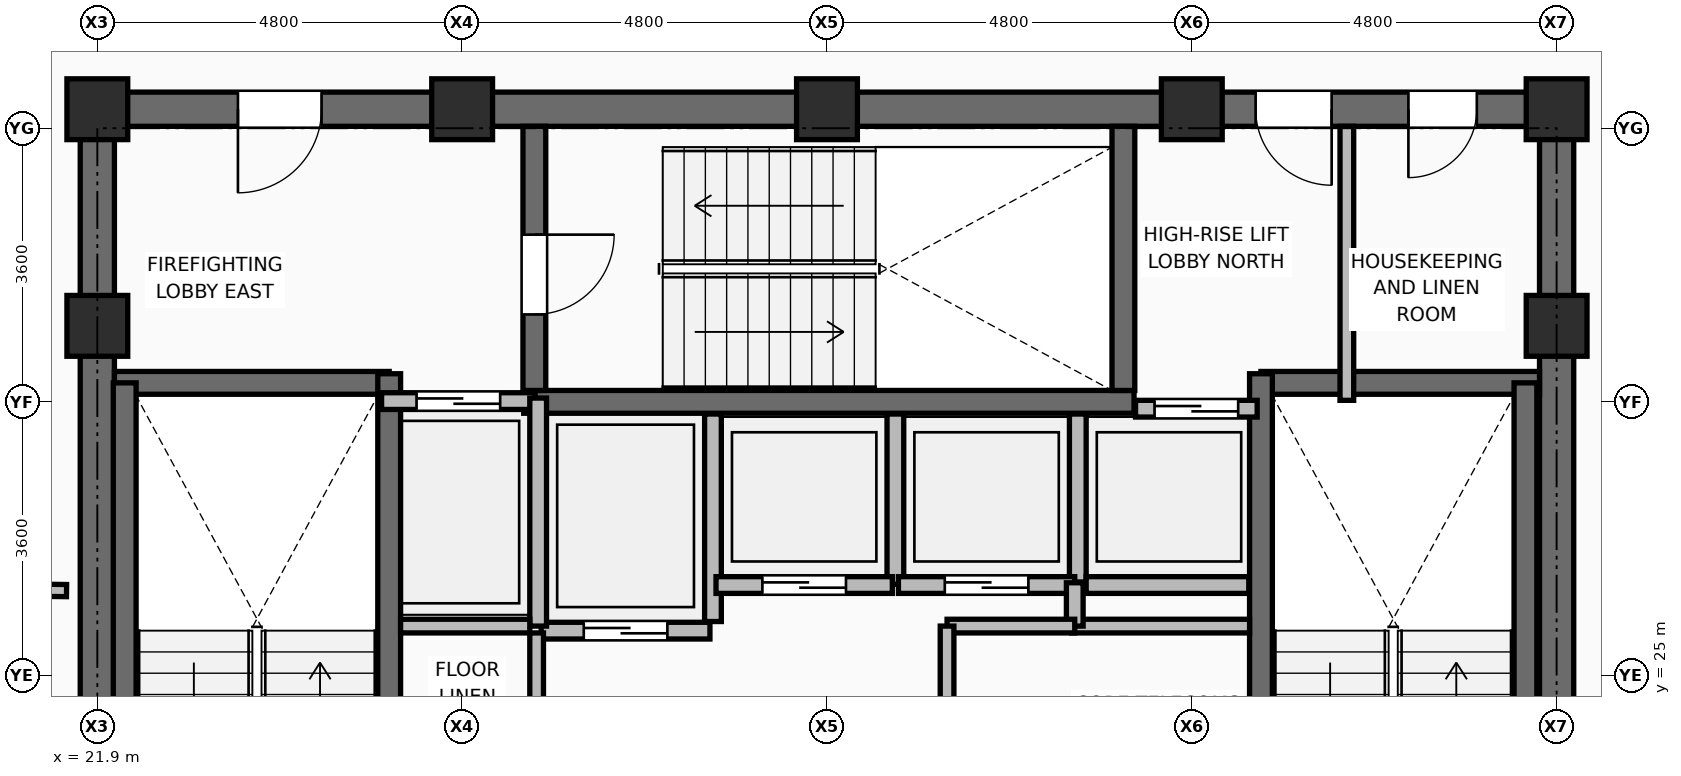
"""IFC4 building model, lengths in metres.
Left out: names, types, materials, properties, quantities, classifications, styles, units other than length and angle.
Written with IfcOpenShell. Run it as: python <this file> out.ifc"""

import sys

from ifc_helpers import new_model, si_unit, direction, frame, frame_2d, origin, origin_2d, place, context, subcontext, project, spatial, rectangle, extrude, element, fill, save


model = new_model("IFC4")
c1 = context("Model", 3, precision=1e-05, world=origin(), true_north=direction((0.0, 1.0)))
c2 = subcontext(c1, "Body", "Model", "MODEL_VIEW")
j1 = project(units=[si_unit("LENGTHUNIT", "METRE"), si_unit("PLANEANGLEUNIT", "RADIAN")], contexts=[c1])
p1 = place(None, origin())
s1 = spatial("IfcSite", under=j1, at=p1, CompositionType="ELEMENT")
p2 = place(p1, origin())
s2 = spatial("IfcBuilding", under=s1, at=p2, CompositionType="ELEMENT")
p3 = place(p2, frame((0.0, 0.0, 246.15)))
s3 = spatial("IfcBuildingStorey", under=s2, at=p3, CompositionType="ELEMENT", Elevation=246.15)
for number, where, z_axis, x_axis in (
    (1, (21.9, 29.6, 0.0), (0.0, 0.0, 1.0), (1.0, 0.0, 0.0)),
    (2, (41.1, 29.6, 0.0), (0.0, 0.0, 1.0), (1.0, 0.0, 0.0)),
    (3, (21.9, 32.45, 0.0), (0.0, 0.0, 1.0), (1.0, 0.0, 0.0)),
    (4, (26.7, 32.45, 0.0), (0.0, 0.0, 1.0), (1.0, 0.0, 0.0)),
    (5, (31.5, 32.45, 0.0), (0.0, 0.0, 1.0), (1.0, 0.0, 0.0)),
    (6, (36.3, 32.45, 0.0), (0.0, 0.0, 1.0), (1.0, 0.0, 0.0)),
    (7, (41.1, 32.45, 0.0), (0.0, 0.0, 1.0), (1.0, 0.0, 0.0)),
):
    element("IfcColumn", number, at=place(p3, frame(where, z_axis=z_axis, x_axis=x_axis)), inside=s3, PredefinedType="COLUMN", context=c2, shape_type="SweptSolid", body=[
        extrude(rectangle(XDim=0.8, YDim=0.8, at=origin_2d()), origin(), (0.0, 0.0, 1.0), 3.75),
    ])
p4 = place(p3, frame((30.0, 25.71, 0.0), z_axis=(0.0, 0.0, 1.0), x_axis=(0.0, 1.0, 0.0)))
e8 = element("IfcWall", 8, at=p4, inside=s3, PredefinedType="PARTITIONING", context=c2, shape_type="SweptSolid", body=[
    extrude(rectangle(XDim=2.73, YDim=0.22, at=frame_2d((1.365, 0.0))), origin(), (0.0, 0.0, 1.0), 3.545),
])
p5 = place(p3, frame((32.4, 26.2, 0.0), z_axis=(0.0, 0.0, 1.0), x_axis=(0.0, 1.0, 0.0)))
e9 = element("IfcWall", 9, at=p5, inside=s3, PredefinedType="PARTITIONING", context=c2, shape_type="SweptSolid", body=[
    extrude(rectangle(XDim=2.24, YDim=0.22, at=frame_2d((1.12, 0.0))), origin(), (0.0, 0.0, 1.0), 3.545),
])
p6 = place(p3, frame((34.8, 26.23, 0.0), z_axis=(0.0, 0.0, 1.0), x_axis=(0.0, 1.0, 0.0)))
e10 = element("IfcWall", 10, at=p6, inside=s3, PredefinedType="PARTITIONING", context=c2, shape_type="SweptSolid", body=[
    extrude(rectangle(XDim=2.21, YDim=0.22, at=frame_2d((1.105, 0.0))), origin(), (0.0, 0.0, 1.0), 3.545),
])
p7 = place(p3, frame((34.91, 26.19, 0.0), z_axis=(0.0, 0.0, 1.0), x_axis=(1.0, 0.0, 0.0)))
e11 = element("IfcWall", 11, at=p7, inside=s3, PredefinedType="PARTITIONING", context=c2, shape_type="SweptSolid", body=[
    extrude(rectangle(XDim=2.14, YDim=0.22, at=frame_2d((1.07, 0.0))), origin(), (0.0, 0.0, 1.0), 3.545),
])
p8 = place(p3, frame((21.675, 32.45, 0.0), z_axis=(0.0, 0.0, 1.0), x_axis=(1.0, 0.0, 0.0)))
e12 = element("IfcWall", 12, at=p8, inside=s3, PredefinedType="SHEAR", context=c2, shape_type="SweptSolid", body=[
    extrude(rectangle(XDim=19.65, YDim=0.45, at=frame_2d((9.825, 0.0))), origin(), (0.0, 0.0, 1.0), 3.57),
])
p9 = place(p8, frame((2.075, 0.0, 0.0)))
e13 = element("IfcOpeningElement", 13, at=p9, cuts=e12, PredefinedType="OPENING", context=c2, shape_type="SweptSolid", body=[
    extrude(rectangle(XDim=1.1, YDim=2.1, at=frame_2d((0.55, 1.05))), frame((0.0, 0.235, 0.0), z_axis=(0.0, -1.0, 0.0), x_axis=(1.0, 0.0, 0.0)), (0.0, 0.0, 1.0), 0.47),
])
p10 = place(p8, frame((15.465, 0.0, 0.0)))
e14 = element("IfcOpeningElement", 14, at=p10, cuts=e12, PredefinedType="OPENING", context=c2, shape_type="SweptSolid", body=[
    extrude(rectangle(XDim=1.0, YDim=2.1, at=frame_2d((0.5, 1.05))), frame((0.0, 0.235, 0.0), z_axis=(0.0, -1.0, 0.0), x_axis=(1.0, 0.0, 0.0)), (0.0, 0.0, 1.0), 0.47),
])
p11 = place(p8, frame((17.475, 0.0, 0.0)))
e15 = element("IfcOpeningElement", 15, at=p11, cuts=e12, PredefinedType="OPENING", context=c2, shape_type="SweptSolid", body=[
    extrude(rectangle(XDim=0.9, YDim=2.1, at=frame_2d((0.45, 1.05))), frame((0.0, 0.235, 0.0), z_axis=(0.0, -1.0, 0.0), x_axis=(1.0, 0.0, 0.0)), (0.0, 0.0, 1.0), 0.47),
])
p12 = place(p3, frame((21.9, 18.025, 0.0), z_axis=(0.0, 0.0, 1.0), x_axis=(0.0, 1.0, 0.0)))
e16 = element("IfcWall", 16, at=p12, inside=s3, PredefinedType="SHEAR", context=c2, shape_type="SweptSolid", body=[
    extrude(rectangle(XDim=14.2, YDim=0.45, at=frame_2d((7.1, 0.0))), origin(), (0.0, 0.0, 1.0), 3.57),
])
p13 = place(p3, frame((41.1, 18.025, 0.0), z_axis=(0.0, 0.0, 1.0), x_axis=(0.0, 1.0, 0.0)))
e17 = element("IfcWall", 17, at=p13, inside=s3, PredefinedType="SHEAR", context=c2, shape_type="SweptSolid", body=[
    extrude(rectangle(XDim=14.2, YDim=0.45, at=frame_2d((7.1, 0.0))), origin(), (0.0, 0.0, 1.0), 3.57),
])
p14 = place(p13, frame((3.435, 0.0, 0.0)))
e18 = element("IfcOpeningElement", 18, at=p14, cuts=e17, PredefinedType="OPENING", context=c2, shape_type="SweptSolid", body=[
    extrude(rectangle(XDim=1.05, YDim=2.1, at=frame_2d((0.525, 1.05))), frame((0.0, 0.235, 0.0), z_axis=(0.0, -1.0, 0.0), x_axis=(1.0, 0.0, 0.0)), (0.0, 0.0, 1.0), 0.47),
])
p15 = place(p3, frame((22.125, 28.85, 0.0), z_axis=(0.0, 0.0, 1.0), x_axis=(1.0, 0.0, 0.0)))
e19 = element("IfcWall", 19, at=p15, inside=s3, PredefinedType="SHEAR", context=c2, shape_type="SweptSolid", body=[
    extrude(rectangle(XDim=3.615, YDim=0.3, at=frame_2d((1.808, 0.0))), origin(), (0.0, 0.0, 1.0), 3.57),
])
p16 = place(p3, frame((25.74, 20.98, 0.0), z_axis=(0.0, 0.0, 1.0), x_axis=(0.0, 1.0, 0.0)))
e20 = element("IfcWall", 20, at=p16, inside=s3, PredefinedType="SHEAR", context=c2, shape_type="SweptSolid", body=[
    extrude(rectangle(XDim=7.99, YDim=0.3, at=frame_2d((3.995, 0.0))), origin(), (0.0, 0.0, 1.0), 3.57),
])
p17 = place(p3, frame((22.26, 21.1, 0.0), z_axis=(0.0, 0.0, 1.0), x_axis=(0.0, 1.0, 0.0)))
e21 = element("IfcWall", 21, at=p17, inside=s3, PredefinedType="SHEAR", context=c2, shape_type="SweptSolid", body=[
    extrude(rectangle(XDim=7.75, YDim=0.3, at=frame_2d((3.875, 0.0))), origin(), (0.0, 0.0, 1.0), 3.57),
])
p18 = place(p3, frame((37.21, 28.85, 0.0), z_axis=(0.0, 0.0, 1.0), x_axis=(1.0, 0.0, 0.0)))
e22 = element("IfcWall", 22, at=p18, inside=s3, PredefinedType="SHEAR", context=c2, shape_type="SweptSolid", body=[
    extrude(rectangle(XDim=3.665, YDim=0.3, at=frame_2d((1.833, 0.0))), origin(), (0.0, 0.0, 1.0), 3.57),
])
p19 = place(p3, frame((37.21, 20.98, 0.0), z_axis=(0.0, 0.0, 1.0), x_axis=(0.0, 1.0, 0.0)))
e23 = element("IfcWall", 23, at=p19, inside=s3, PredefinedType="SHEAR", context=c2, shape_type="SweptSolid", body=[
    extrude(rectangle(XDim=7.99, YDim=0.3, at=frame_2d((3.995, 0.0))), origin(), (0.0, 0.0, 1.0), 3.57),
])
p20 = place(p3, frame((40.69, 22.65, 0.0), z_axis=(0.0, 0.0, 1.0), x_axis=(0.0, 1.0, 0.0)))
e24 = element("IfcWall", 24, at=p20, inside=s3, PredefinedType="SHEAR", context=c2, shape_type="SweptSolid", body=[
    extrude(rectangle(XDim=6.2, YDim=0.3, at=frame_2d((3.1, 0.0))), origin(), (0.0, 0.0, 1.0), 3.57),
])
p21 = place(p3, frame((27.51, 28.6, 0.0), z_axis=(0.0, 0.0, 1.0), x_axis=(1.0, 0.0, 0.0)))
e25 = element("IfcWall", 25, at=p21, inside=s3, PredefinedType="SHEAR", context=c2, shape_type="SweptSolid", body=[
    extrude(rectangle(XDim=8.03, YDim=0.3, at=frame_2d((4.015, 0.0))), origin(), (0.0, 0.0, 1.0), 3.57),
])
p22 = place(p3, frame((27.65, 28.75, 0.0), z_axis=(0.0, 0.0, 1.0), x_axis=(0.0, 1.0, 0.0)))
e26 = element("IfcWall", 26, at=p22, inside=s3, PredefinedType="SHEAR", context=c2, shape_type="SweptSolid", body=[
    extrude(rectangle(XDim=3.475, YDim=0.3, at=frame_2d((1.738, 0.0))), origin(), (0.0, 0.0, 1.0), 3.57),
])
p23 = place(p22, frame((1.0, 0.0, 0.0)))
e27 = element("IfcOpeningElement", 27, at=p23, cuts=e26, PredefinedType="OPENING", context=c2, shape_type="SweptSolid", body=[
    extrude(rectangle(XDim=1.05, YDim=2.1, at=frame_2d((0.525, 1.05))), frame((0.0, 0.16, 0.0), z_axis=(0.0, -1.0, 0.0), x_axis=(1.0, 0.0, 0.0)), (0.0, 0.0, 1.0), 0.32),
])
p24 = place(p3, frame((35.4, 28.75, 0.0), z_axis=(0.0, 0.0, 1.0), x_axis=(0.0, 1.0, 0.0)))
e28 = element("IfcWall", 28, at=p24, inside=s3, PredefinedType="SHEAR", context=c2, shape_type="SweptSolid", body=[
    extrude(rectangle(XDim=3.475, YDim=0.3, at=frame_2d((1.738, 0.0))), origin(), (0.0, 0.0, 1.0), 3.57),
])
p25 = place(p3, frame((25.64, 28.61, 0.0), z_axis=(0.0, 0.0, 1.0), x_axis=(1.0, 0.0, 0.0)))
e29 = element("IfcWall", 29, at=p25, inside=s3, PredefinedType="PARTITIONING", context=c2, shape_type="SweptSolid", body=[
    extrude(rectangle(XDim=2.02, YDim=0.22, at=frame_2d((1.01, 0.0))), origin(), (0.0, 0.0, 1.0), 3.55),
])
p26 = place(p25, frame((0.46, 0.0, 0.0)))
e30 = element("IfcOpeningElement", 30, at=p26, cuts=e29, PredefinedType="OPENING", context=c2, shape_type="SweptSolid", body=[
    extrude(rectangle(XDim=1.1, YDim=2.2, at=frame_2d((0.55, 1.1))), frame((0.0, 0.12, 0.0), z_axis=(0.0, -1.0, 0.0), x_axis=(1.0, 0.0, 0.0)), (0.0, 0.0, 1.0), 0.24),
])
p27 = place(p3, frame((27.74, 25.59, 0.0), z_axis=(0.0, 0.0, 1.0), x_axis=(1.0, 0.0, 0.0)))
e31 = element("IfcWall", 31, at=p27, inside=s3, PredefinedType="PARTITIONING", context=c2, shape_type="SweptSolid", body=[
    extrude(rectangle(XDim=2.22, YDim=0.22, at=frame_2d((1.11, 0.0))), origin(), (0.0, 0.0, 1.0), 3.55),
])
p28 = place(p27, frame((0.56, 0.0, 0.0)))
e32 = element("IfcOpeningElement", 32, at=p28, cuts=e31, PredefinedType="OPENING", context=c2, shape_type="SweptSolid", body=[
    extrude(rectangle(XDim=1.1, YDim=2.2, at=frame_2d((0.55, 1.1))), frame((0.0, 0.12, 0.0), z_axis=(0.0, -1.0, 0.0), x_axis=(1.0, 0.0, 0.0)), (0.0, 0.0, 1.0), 0.24),
])
p29 = place(p3, frame((30.04, 26.19, 0.0), z_axis=(0.0, 0.0, 1.0), x_axis=(1.0, 0.0, 0.0)))
e33 = element("IfcWall", 33, at=p29, inside=s3, PredefinedType="PARTITIONING", context=c2, shape_type="SweptSolid", body=[
    extrude(rectangle(XDim=2.32, YDim=0.22, at=frame_2d((1.16, 0.0))), origin(), (0.0, 0.0, 1.0), 3.55),
])
p30 = place(p29, frame((0.61, 0.0, 0.0)))
e34 = element("IfcOpeningElement", 34, at=p30, cuts=e33, PredefinedType="OPENING", context=c2, shape_type="SweptSolid", body=[
    extrude(rectangle(XDim=1.1, YDim=2.2, at=frame_2d((0.55, 1.1))), frame((0.0, 0.12, 0.0), z_axis=(0.0, -1.0, 0.0), x_axis=(1.0, 0.0, 0.0)), (0.0, 0.0, 1.0), 0.24),
])
p31 = place(p3, frame((32.44, 26.19, 0.0), z_axis=(0.0, 0.0, 1.0), x_axis=(1.0, 0.0, 0.0)))
e35 = element("IfcWall", 35, at=p31, inside=s3, PredefinedType="PARTITIONING", context=c2, shape_type="SweptSolid", body=[
    extrude(rectangle(XDim=2.32, YDim=0.22, at=frame_2d((1.16, 0.0))), origin(), (0.0, 0.0, 1.0), 3.55),
])
p32 = place(p31, frame((0.61, 0.0, 0.0)))
e36 = element("IfcOpeningElement", 36, at=p32, cuts=e35, PredefinedType="OPENING", context=c2, shape_type="SweptSolid", body=[
    extrude(rectangle(XDim=1.1, YDim=2.2, at=frame_2d((0.55, 1.1))), frame((0.0, 0.12, 0.0), z_axis=(0.0, -1.0, 0.0), x_axis=(1.0, 0.0, 0.0)), (0.0, 0.0, 1.0), 0.24),
])
p33 = place(p3, frame((35.56, 28.51, 0.0), z_axis=(0.0, 0.0, 1.0), x_axis=(1.0, 0.0, 0.0)))
e37 = element("IfcWall", 37, at=p33, inside=s3, PredefinedType="PARTITIONING", context=c2, shape_type="SweptSolid", body=[
    extrude(rectangle(XDim=1.6, YDim=0.22, at=frame_2d((0.8, 0.0))), origin(), (0.0, 0.0, 1.0), 3.55),
])
p34 = place(p33, frame((0.25, 0.0, 0.0)))
e38 = element("IfcOpeningElement", 38, at=p34, cuts=e37, PredefinedType="OPENING", context=c2, shape_type="SweptSolid", body=[
    extrude(rectangle(XDim=1.1, YDim=2.2, at=frame_2d((0.55, 1.1))), frame((0.0, 0.12, 0.0), z_axis=(0.0, -1.0, 0.0), x_axis=(1.0, 0.0, 0.0)), (0.0, 0.0, 1.0), 0.24),
])
p35 = place(p3, frame((27.7, 25.65, 0.0), z_axis=(0.0, 0.0, 1.0), x_axis=(0.0, 1.0, 0.0)))
e39 = element("IfcWall", 39, at=p35, inside=s3, PredefinedType="PARTITIONING", context=c2, shape_type="SweptSolid", body=[
    extrude(rectangle(XDim=3.0, YDim=0.22, at=frame_2d((1.5, 0.0))), origin(), (0.0, 0.0, 1.0), 3.55),
])
p36 = place(p3, frame((25.89, 25.65, 0.0), z_axis=(0.0, 0.0, 1.0), x_axis=(1.0, 0.0, 0.0)))
e40 = element("IfcWall", 40, at=p36, inside=s3, PredefinedType="PARTITIONING", context=c2, shape_type="SweptSolid", body=[
    extrude(rectangle(XDim=1.7, YDim=0.18, at=frame_2d((0.85, 0.0))), origin(), (0.0, 0.0, 1.0), 3.55),
])
p37 = place(p3, frame((27.68, 24.2, 0.0), z_axis=(0.0, 0.0, 1.0), x_axis=(0.0, 1.0, 0.0)))
e41 = element("IfcWall", 41, at=p37, inside=s3, PredefinedType="PARTITIONING", context=c2, shape_type="SweptSolid", body=[
    extrude(rectangle(XDim=1.36, YDim=0.18, at=frame_2d((0.68, 0.0))), origin(), (0.0, 0.0, 1.0), 3.55),
])
p38 = place(p3, frame((34.72, 25.65, 0.0), z_axis=(0.0, 0.0, 1.0), x_axis=(1.0, 0.0, 0.0)))
e42 = element("IfcWall", 42, at=p38, inside=s3, PredefinedType="PARTITIONING", context=c2, shape_type="SweptSolid", body=[
    extrude(rectangle(XDim=2.34, YDim=0.18, at=frame_2d((1.17, 0.0))), origin(), (0.0, 0.0, 1.0), 3.55),
])
p39 = place(p3, frame((34.76, 25.65, 0.0), z_axis=(0.0, 0.0, 1.0), x_axis=(0.0, 1.0, 0.0)))
e43 = element("IfcWall", 43, at=p39, inside=s3, PredefinedType="PARTITIONING", context=c2, shape_type="SweptSolid", body=[
    extrude(rectangle(XDim=0.57, YDim=0.22, at=frame_2d((0.285, 0.0))), origin(), (0.0, 0.0, 1.0), 3.55),
])
p40 = place(p3, frame((33.08, 25.65, 0.0), z_axis=(0.0, 0.0, 1.0), x_axis=(1.0, 0.0, 0.0)))
e44 = element("IfcWall", 44, at=p40, inside=s3, PredefinedType="PARTITIONING", context=c2, shape_type="SweptSolid", body=[
    extrude(rectangle(XDim=1.68, YDim=0.18, at=frame_2d((0.84, 0.0))), origin(), (0.0, 0.0, 1.0), 3.55),
])
p41 = place(p3, frame((33.08, 23.48, 0.0), z_axis=(0.0, 0.0, 1.0), x_axis=(0.0, 1.0, 0.0)))
e45 = element("IfcWall", 45, at=p41, inside=s3, PredefinedType="PARTITIONING", context=c2, shape_type="SweptSolid", body=[
    extrude(rectangle(XDim=2.17, YDim=0.18, at=frame_2d((1.085, 0.0))), origin(), (0.0, 0.0, 1.0), 3.55),
])
p42 = place(p3, frame((38.34, 28.62, 0.0), z_axis=(0.0, 0.0, 1.0), x_axis=(0.0, 1.0, 0.0)))
e46 = element("IfcWall", 46, at=p42, inside=s3, PredefinedType="PARTITIONING", context=c2, shape_type="SweptSolid", body=[
    extrude(rectangle(XDim=3.605, YDim=0.18, at=frame_2d((1.802, 0.0))), origin(), (0.0, 0.0, 1.0), 3.55),
])
p43 = place(p3, frame((21.495, 26.117, 0.0), z_axis=(0.0, 0.0, 1.0), x_axis=(-0.999908537082, 0.013524698532, 0.0)))
e47 = element("IfcWall", 47, at=p43, inside=s3, PredefinedType="PARTITIONING", context=c2, shape_type="SweptSolid", body=[
    extrude(rectangle(XDim=1.859, YDim=0.16, at=frame_2d((0.93, 0.0))), origin(), (0.0, 0.0, 1.0), 2.595),
])
p44 = place(p23, frame((1.05, 0.0, 0.0), z_axis=(0.0, 0.0, 1.0), x_axis=(-1.0, 0.0, 0.0)))
e48 = element("IfcDoor", 48, at=p44, inside=s3, OperationType="SINGLE_SWING_LEFT", PredefinedType="DOOR", context=c2, shape_type="SweptSolid", body=[
    extrude(rectangle(XDim=1.05, YDim=2.1, at=frame_2d((0.525, 1.05))), frame((0.0, 0.025, 0.0), z_axis=(0.0, -1.0, 0.0), x_axis=(1.0, 0.0, 0.0)), (0.0, 0.0, 1.0), 0.05),
])
fill(e27, e48)
p45 = place(p26, origin())
e49 = element("IfcDoor", 49, at=p45, inside=s3, OperationType="DOUBLE_DOOR_SLIDING", PredefinedType="DOOR", context=c2, shape_type="SweptSolid", body=[
    extrude(rectangle(XDim=1.1, YDim=2.2, at=frame_2d((0.55, 1.1))), frame((0.0, 0.025, 0.0), z_axis=(0.0, -1.0, 0.0), x_axis=(1.0, 0.0, 0.0)), (0.0, 0.0, 1.0), 0.05),
])
fill(e30, e49)
p46 = place(p28, frame((1.1, 0.0, 0.0), z_axis=(0.0, 0.0, 1.0), x_axis=(-1.0, 0.0, 0.0)))
e50 = element("IfcDoor", 50, at=p46, inside=s3, OperationType="DOUBLE_DOOR_SLIDING", PredefinedType="DOOR", context=c2, shape_type="SweptSolid", body=[
    extrude(rectangle(XDim=1.1, YDim=2.2, at=frame_2d((0.55, 1.1))), frame((0.0, 0.025, 0.0), z_axis=(0.0, -1.0, 0.0), x_axis=(1.0, 0.0, 0.0)), (0.0, 0.0, 1.0), 0.05),
])
fill(e32, e50)
p47 = place(p30, frame((1.1, 0.0, 0.0), z_axis=(0.0, 0.0, 1.0), x_axis=(-1.0, 0.0, 0.0)))
e51 = element("IfcDoor", 51, at=p47, inside=s3, OperationType="DOUBLE_DOOR_SLIDING", PredefinedType="DOOR", context=c2, shape_type="SweptSolid", body=[
    extrude(rectangle(XDim=1.1, YDim=2.2, at=frame_2d((0.55, 1.1))), frame((0.0, 0.025, 0.0), z_axis=(0.0, -1.0, 0.0), x_axis=(1.0, 0.0, 0.0)), (0.0, 0.0, 1.0), 0.05),
])
fill(e34, e51)
p48 = place(p32, frame((1.1, 0.0, 0.0), z_axis=(0.0, 0.0, 1.0), x_axis=(-1.0, 0.0, 0.0)))
e52 = element("IfcDoor", 52, at=p48, inside=s3, OperationType="DOUBLE_DOOR_SLIDING", PredefinedType="DOOR", context=c2, shape_type="SweptSolid", body=[
    extrude(rectangle(XDim=1.1, YDim=2.2, at=frame_2d((0.55, 1.1))), frame((0.0, 0.025, 0.0), z_axis=(0.0, -1.0, 0.0), x_axis=(1.0, 0.0, 0.0)), (0.0, 0.0, 1.0), 0.05),
])
fill(e36, e52)
p49 = place(p34, origin())
e53 = element("IfcDoor", 53, at=p49, inside=s3, OperationType="DOUBLE_DOOR_SLIDING", PredefinedType="DOOR", context=c2, shape_type="SweptSolid", body=[
    extrude(rectangle(XDim=1.1, YDim=2.2, at=frame_2d((0.55, 1.1))), frame((0.0, 0.025, 0.0), z_axis=(0.0, -1.0, 0.0), x_axis=(1.0, 0.0, 0.0)), (0.0, 0.0, 1.0), 0.05),
])
fill(e38, e53)
p50 = place(p9, frame((1.1, 0.0, 0.0), z_axis=(0.0, 0.0, 1.0), x_axis=(-1.0, 0.0, 0.0)))
e54 = element("IfcDoor", 54, at=p50, inside=s3, OperationType="SINGLE_SWING_RIGHT", PredefinedType="DOOR", context=c2, shape_type="SweptSolid", body=[
    extrude(rectangle(XDim=1.1, YDim=2.1, at=frame_2d((0.55, 1.05))), frame((0.0, 0.025, 0.0), z_axis=(0.0, -1.0, 0.0), x_axis=(1.0, 0.0, 0.0)), (0.0, 0.0, 1.0), 0.05),
])
fill(e13, e54)
p51 = place(p10, frame((1.0, 0.0, 0.0), z_axis=(0.0, 0.0, 1.0), x_axis=(-1.0, 0.0, 0.0)))
e55 = element("IfcDoor", 55, at=p51, inside=s3, OperationType="SINGLE_SWING_LEFT", PredefinedType="DOOR", context=c2, shape_type="SweptSolid", body=[
    extrude(rectangle(XDim=1.0, YDim=2.1, at=frame_2d((0.5, 1.05))), frame((0.0, 0.025, 0.0), z_axis=(0.0, -1.0, 0.0), x_axis=(1.0, 0.0, 0.0)), (0.0, 0.0, 1.0), 0.05),
])
fill(e14, e55)
p52 = place(p11, frame((0.9, 0.0, 0.0), z_axis=(0.0, 0.0, 1.0), x_axis=(-1.0, 0.0, 0.0)))
e56 = element("IfcDoor", 56, at=p52, inside=s3, OperationType="SINGLE_SWING_RIGHT", PredefinedType="DOOR", context=c2, shape_type="SweptSolid", body=[
    extrude(rectangle(XDim=0.9, YDim=2.1, at=frame_2d((0.45, 1.05))), frame((0.0, 0.025, 0.0), z_axis=(0.0, -1.0, 0.0), x_axis=(1.0, 0.0, 0.0)), (0.0, 0.0, 1.0), 0.05),
])
fill(e15, e56)
save(model, sys.argv[1])
